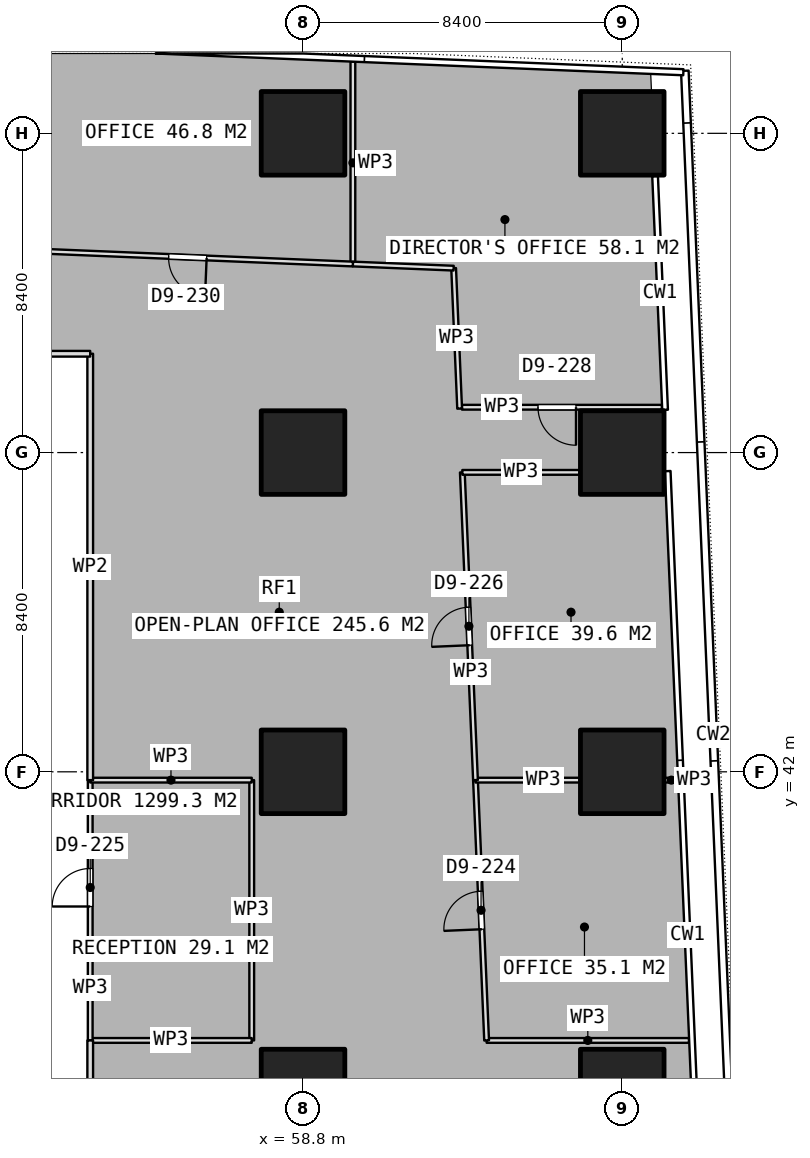
"""IFC4 building model, lengths in metres.
Left out: names, types, materials, properties, quantities, classifications, styles, units other than length and angle.
Written with IfcOpenShell. Run it as: python <this file> out.ifc"""

import sys

from ifc_helpers import new_model, si_unit, direction, frame, frame_2d, origin, origin_2d, place, context, subcontext, project, spatial, rectangle, extrude, element, fill, save


model = new_model("IFC4")
c1 = context("Model", 3, precision=1e-05, world=origin(), true_north=direction((0.0, 1.0)))
c2 = subcontext(c1, "Body", "Model", "MODEL_VIEW")
j1 = project(units=[si_unit("LENGTHUNIT", "METRE"), si_unit("PLANEANGLEUNIT", "RADIAN")], contexts=[c1])
p1 = place(None, origin())
s1 = spatial("IfcSite", under=j1, at=p1, CompositionType="ELEMENT")
p2 = place(p1, origin())
s2 = spatial("IfcBuilding", under=s1, at=p2, CompositionType="ELEMENT")
p3 = place(p2, frame((0.0, 0.0, 66.65)))
s3 = spatial("IfcBuildingStorey", under=s2, at=p3, CompositionType="ELEMENT", Elevation=66.65)
for number, where, z_axis, x_axis in (
    (1, (58.8, 33.6, 0.0), (0.0, 0.0, 1.0), (1.0, 0.0, 0.0)),
    (2, (58.8, 42.0, 0.0), (0.0, 0.0, 1.0), (1.0, 0.0, 0.0)),
    (3, (58.8, 50.4, 0.0), (0.0, 0.0, 1.0), (1.0, 0.0, 0.0)),
    (4, (58.8, 58.8, 0.0), (0.0, 0.0, 1.0), (1.0, 0.0, 0.0)),
    (5, (67.2, 33.6, 0.0), (0.0, 0.0, 1.0), (1.0, 0.0, 0.0)),
    (6, (67.2, 42.0, 0.0), (0.0, 0.0, 1.0), (1.0, 0.0, 0.0)),
    (7, (67.2, 50.4, 0.0), (0.0, 0.0, 1.0), (1.0, 0.0, 0.0)),
    (8, (67.2, 58.8, 0.0), (0.0, 0.0, 1.0), (1.0, 0.0, 0.0)),
):
    element("IfcColumn", number, at=place(p3, frame(where, z_axis=z_axis, x_axis=x_axis)), inside=s3, PredefinedType="COLUMN", context=c2, shape_type="SweptSolid", body=[
        extrude(rectangle(XDim=2.2, YDim=2.2, at=origin_2d()), origin(), (0.0, 0.0, 1.0), 3.75),
    ])
p4 = place(p3, frame((68.956, 34.932, 0.0), z_axis=(0.0, 0.0, 1.0), x_axis=(-1.0, 0.0, 0.0)))
e9 = element("IfcWall", 9, at=p4, inside=s3, PredefinedType="PARTITIONING", context=c2, shape_type="SweptSolid", body=[
    extrude(rectangle(XDim=5.325, YDim=0.125, at=frame_2d((2.663, 0.0))), origin(), (0.0, 0.0, 1.0), 3.5),
])
p5 = place(p3, frame((63.631, 34.932, 0.0), z_axis=(0.0, 0.0, 1.0), x_axis=(-0.042771118603, 0.999084897, 0.0)))
e10 = element("IfcWall", 10, at=p5, inside=s3, PredefinedType="PARTITIONING", context=c2, shape_type="SweptSolid", body=[
    extrude(rectangle(XDim=6.855, YDim=0.125, at=frame_2d((3.428, 0.0))), origin(), (0.0, 0.0, 1.0), 3.5),
])
p6 = place(p5, frame((2.928, 0.0, 0.0)))
e11 = element("IfcOpeningElement", 11, at=p6, cuts=e10, PredefinedType="OPENING", context=c2, shape_type="SweptSolid", body=[
    extrude(rectangle(XDim=1.0, YDim=2.1, at=frame_2d((0.5, 1.05))), frame((0.0, 0.073, 0.0), z_axis=(0.0, -1.0, 0.0), x_axis=(1.0, 0.0, 0.0)), (0.0, 0.0, 1.0), 0.145),
])
p7 = place(p3, frame((63.338, 41.781, 0.0), z_axis=(0.0, 0.0, 1.0), x_axis=(1.0, 0.0, 0.0)))
e12 = element("IfcWall", 12, at=p7, inside=s3, PredefinedType="PARTITIONING", context=c2, shape_type="SweptSolid", body=[
    extrude(rectangle(XDim=2.742, YDim=0.125, at=frame_2d((1.371, 0.0))), origin(), (0.0, 0.0, 1.0), 3.5),
])
p8 = place(p3, frame((68.32, 41.781, 0.0), z_axis=(0.0, 0.0, 1.0), x_axis=(1.0, 0.0, 0.0)))
e13 = element("IfcWall", 13, at=p8, inside=s3, PredefinedType="PARTITIONING", context=c2, shape_type="SweptSolid", body=[
    extrude(rectangle(XDim=0.343, YDim=0.125, at=frame_2d((0.171, 0.0))), origin(), (0.0, 0.0, 1.0), 3.5),
])
p9 = place(p3, frame((63.338, 41.782, 0.0), z_axis=(0.0, 0.0, 1.0), x_axis=(-0.042686820675, 0.999088502256, 0.0)))
e14 = element("IfcWall", 14, at=p9, inside=s3, PredefinedType="PARTITIONING", context=c2, shape_type="SweptSolid", body=[
    extrude(rectangle(XDim=8.104, YDim=0.125, at=frame_2d((4.052, 0.0))), origin(), (0.0, 0.0, 1.0), 3.5),
])
p10 = place(p9, frame((3.552, 0.0, 0.0)))
e15 = element("IfcOpeningElement", 15, at=p10, cuts=e14, PredefinedType="OPENING", context=c2, shape_type="SweptSolid", body=[
    extrude(rectangle(XDim=1.0, YDim=2.1, at=frame_2d((0.5, 1.05))), frame((0.0, 0.073, 0.0), z_axis=(0.0, -1.0, 0.0), x_axis=(1.0, 0.0, 0.0)), (0.0, 0.0, 1.0), 0.145),
])
p11 = place(p3, frame((62.992, 49.879, 0.0), z_axis=(0.0, 0.0, 1.0), x_axis=(1.0, 0.0, 0.0)))
e16 = element("IfcWall", 16, at=p11, inside=s3, PredefinedType="PARTITIONING", context=c2, shape_type="SweptSolid", body=[
    extrude(rectangle(XDim=3.088, YDim=0.125, at=frame_2d((1.544, 0.0))), origin(), (0.0, 0.0, 1.0), 3.5),
])
p12 = place(p3, frame((60.112, 55.361, 0.0), z_axis=(0.0, 0.0, 1.0), x_axis=(0.0, 1.0, 0.0)))
e17 = element("IfcWall", 17, at=p12, inside=s3, PredefinedType="PARTITIONING", context=c2, shape_type="SweptSolid", body=[
    extrude(rectangle(XDim=5.325, YDim=0.125, at=frame_2d((2.663, 0.0))), origin(), (0.0, 0.0, 1.0), 3.5),
])
p13 = place(p3, frame((68.244, 51.593, 0.0), z_axis=(0.0, 0.0, 1.0), x_axis=(-1.0, 0.0, 0.0)))
e18 = element("IfcWall", 18, at=p13, inside=s3, PredefinedType="PARTITIONING", context=c2, shape_type="SweptSolid", body=[
    extrude(rectangle(XDim=5.262, YDim=0.125, at=frame_2d((2.631, 0.0))), origin(), (0.0, 0.0, 1.0), 3.5),
])
p14 = place(p13, frame((2.261, 0.0, 0.0)))
e19 = element("IfcOpeningElement", 19, at=p14, cuts=e18, PredefinedType="OPENING", context=c2, shape_type="SweptSolid", body=[
    extrude(rectangle(XDim=1.0, YDim=2.1, at=frame_2d((0.5, 1.05))), frame((0.0, 0.073, 0.0), z_axis=(0.0, -1.0, 0.0), x_axis=(1.0, 0.0, 0.0)), (0.0, 0.0, 1.0), 0.145),
])
p15 = place(p3, frame((62.921, 51.557, 0.0), z_axis=(0.0, 0.0, 1.0), x_axis=(-0.042709589124, 0.999087529197, 0.0)))
e20 = element("IfcWall", 20, at=p15, inside=s3, PredefinedType="PARTITIONING", context=c2, shape_type="SweptSolid", body=[
    extrude(rectangle(XDim=3.698, YDim=0.125, at=frame_2d((1.849, 0.0))), origin(), (0.0, 0.0, 1.0), 3.5),
])
p16 = place(p3, frame((62.763, 55.252, 0.0), z_axis=(0.0, 0.0, 1.0), x_axis=(-0.999153681613, 0.041132961474, 0.0)))
e21 = element("IfcWall", 21, at=p16, inside=s3, PredefinedType="PARTITIONING", context=c2, shape_type="SweptSolid", body=[
    extrude(rectangle(XDim=2.653, YDim=0.125, at=frame_2d((1.327, 0.0))), origin(), (0.0, 0.0, 1.0), 3.5),
])
p17 = place(p3, frame((60.111, 55.361, 0.0), z_axis=(0.0, 0.0, 1.0), x_axis=(-0.99914928457, 0.041239630726, 0.0)))
e22 = element("IfcWall", 22, at=p17, inside=s3, PredefinedType="PARTITIONING", context=c2, shape_type="SweptSolid", body=[
    extrude(rectangle(XDim=8.702, YDim=0.125, at=frame_2d((4.351, 0.0))), origin(), (0.0, 0.0, 1.0), 3.5),
])
p18 = place(p17, frame((3.851, 0.0, 0.0)))
e23 = element("IfcOpeningElement", 23, at=p18, cuts=e22, PredefinedType="OPENING", context=c2, shape_type="SweptSolid", body=[
    extrude(rectangle(XDim=1.0, YDim=2.1, at=frame_2d((0.5, 1.05))), frame((0.0, 0.073, 0.0), z_axis=(0.0, -1.0, 0.0), x_axis=(1.0, 0.0, 0.0)), (0.0, 0.0, 1.0), 0.145),
])
p19 = place(p3, frame((57.45, 41.781, 0.0), z_axis=(0.0, 0.0, 1.0), x_axis=(0.0, -1.0, 0.0)))
e24 = element("IfcWall", 24, at=p19, inside=s3, PredefinedType="PARTITIONING", context=c2, shape_type="SweptSolid", body=[
    extrude(rectangle(XDim=6.849, YDim=0.125, at=frame_2d((3.425, 0.0))), origin(), (0.0, 0.0, 1.0), 3.5),
])
p20 = place(p3, frame((57.45, 34.932, 0.0), z_axis=(0.0, 0.0, 1.0), x_axis=(-1.0, 0.0, 0.0)))
e25 = element("IfcWall", 25, at=p20, inside=s3, PredefinedType="PARTITIONING", context=c2, shape_type="SweptSolid", body=[
    extrude(rectangle(XDim=4.25, YDim=0.125, at=frame_2d((2.125, 0.0))), origin(), (0.0, 0.0, 1.0), 3.5),
])
p21 = place(p3, frame((53.2, 34.932, 0.0), z_axis=(0.0, 0.0, 1.0), x_axis=(0.0, 1.0, 0.0)))
e26 = element("IfcWall", 26, at=p21, inside=s3, PredefinedType="PARTITIONING", context=c2, shape_type="SweptSolid", body=[
    extrude(rectangle(XDim=6.849, YDim=0.125, at=frame_2d((3.425, 0.0))), origin(), (0.0, 0.0, 1.0), 3.5),
])
p22 = place(p21, frame((3.524, 0.0, 0.0)))
e27 = element("IfcOpeningElement", 27, at=p22, cuts=e26, PredefinedType="OPENING", context=c2, shape_type="SweptSolid", body=[
    extrude(rectangle(XDim=1.0, YDim=2.1, at=frame_2d((0.5, 1.05))), frame((0.0, 0.073, 0.0), z_axis=(0.0, -1.0, 0.0), x_axis=(1.0, 0.0, 0.0)), (0.0, 0.0, 1.0), 0.145),
])
p23 = place(p3, frame((53.2, 41.781, 0.0), z_axis=(0.0, 0.0, 1.0), x_axis=(1.0, 0.0, 0.0)))
e28 = element("IfcWall", 28, at=p23, inside=s3, PredefinedType="PARTITIONING", context=c2, shape_type="SweptSolid", body=[
    extrude(rectangle(XDim=4.25, YDim=0.125, at=frame_2d((2.125, 0.0))), origin(), (0.0, 0.0, 1.0), 3.5),
])
p24 = place(p3, frame((53.2, 31.2, 0.0), z_axis=(0.0, 0.0, 1.0), x_axis=(0.0, 1.0, 0.0)))
e29 = element("IfcWall", 29, at=p24, inside=s3, PredefinedType="PARTITIONING", context=c2, shape_type="SweptSolid", body=[
    extrude(rectangle(XDim=3.732, YDim=0.15, at=frame_2d((1.866, 0.0))), origin(), (0.0, 0.0, 1.0), 3.5),
])
p25 = place(p3, frame((53.2, 41.781, 0.0), z_axis=(0.0, 0.0, 1.0), x_axis=(0.0, 1.0, 0.0)))
e30 = element("IfcWall", 30, at=p25, inside=s3, PredefinedType="PARTITIONING", context=c2, shape_type="SweptSolid", body=[
    extrude(rectangle(XDim=11.219, YDim=0.15, at=frame_2d((5.609, 0.0))), origin(), (0.0, 0.0, 1.0), 3.5),
])
p26 = place(p3, frame((53.2, 53.0, 0.0), z_axis=(0.0, 0.0, 1.0), x_axis=(-1.0, 0.0, 0.0)))
e31 = element("IfcWall", 31, at=p26, inside=s3, PredefinedType="PARTITIONING", context=c2, shape_type="SweptSolid", body=[
    extrude(rectangle(XDim=1.784, YDim=0.15, at=frame_2d((0.892, 0.0))), origin(), (0.0, 0.0, 1.0), 3.5),
])
p27 = place(p6, origin())
e32 = element("IfcDoor", 32, at=p27, inside=s3, OperationType="SINGLE_SWING_LEFT", PredefinedType="DOOR", context=c2, shape_type="SweptSolid", body=[
    extrude(rectangle(XDim=1.0, YDim=2.1, at=frame_2d((0.5, 1.05))), frame((0.0, 0.025, 0.0), z_axis=(0.0, -1.0, 0.0), x_axis=(1.0, 0.0, 0.0)), (0.0, 0.0, 1.0), 0.05),
])
fill(e11, e32)
p28 = place(p10, origin())
e33 = element("IfcDoor", 33, at=p28, inside=s3, OperationType="SINGLE_SWING_LEFT", PredefinedType="DOOR", context=c2, shape_type="SweptSolid", body=[
    extrude(rectangle(XDim=1.0, YDim=2.1, at=frame_2d((0.5, 1.05))), frame((0.0, 0.025, 0.0), z_axis=(0.0, -1.0, 0.0), x_axis=(1.0, 0.0, 0.0)), (0.0, 0.0, 1.0), 0.05),
])
fill(e15, e33)
p29 = place(p14, origin())
e34 = element("IfcDoor", 34, at=p29, inside=s3, OperationType="SINGLE_SWING_LEFT", PredefinedType="DOOR", context=c2, shape_type="SweptSolid", body=[
    extrude(rectangle(XDim=1.0, YDim=2.1, at=frame_2d((0.5, 1.05))), frame((0.0, 0.025, 0.0), z_axis=(0.0, -1.0, 0.0), x_axis=(1.0, 0.0, 0.0)), (0.0, 0.0, 1.0), 0.05),
])
fill(e19, e34)
p30 = place(p18, origin())
e35 = element("IfcDoor", 35, at=p30, inside=s3, OperationType="SINGLE_SWING_LEFT", PredefinedType="DOOR", context=c2, shape_type="SweptSolid", body=[
    extrude(rectangle(XDim=1.0, YDim=2.1, at=frame_2d((0.5, 1.05))), frame((0.0, 0.025, 0.0), z_axis=(0.0, -1.0, 0.0), x_axis=(1.0, 0.0, 0.0)), (0.0, 0.0, 1.0), 0.05),
])
fill(e23, e35)
p31 = place(p22, origin())
e36 = element("IfcDoor", 36, at=p31, inside=s3, OperationType="SINGLE_SWING_LEFT", PredefinedType="DOOR", context=c2, shape_type="SweptSolid", body=[
    extrude(rectangle(XDim=1.0, YDim=2.1, at=frame_2d((0.5, 1.05))), frame((0.0, 0.025, 0.0), z_axis=(0.0, -1.0, 0.0), x_axis=(1.0, 0.0, 0.0)), (0.0, 0.0, 1.0), 0.05),
])
fill(e27, e36)
save(model, sys.argv[1])
